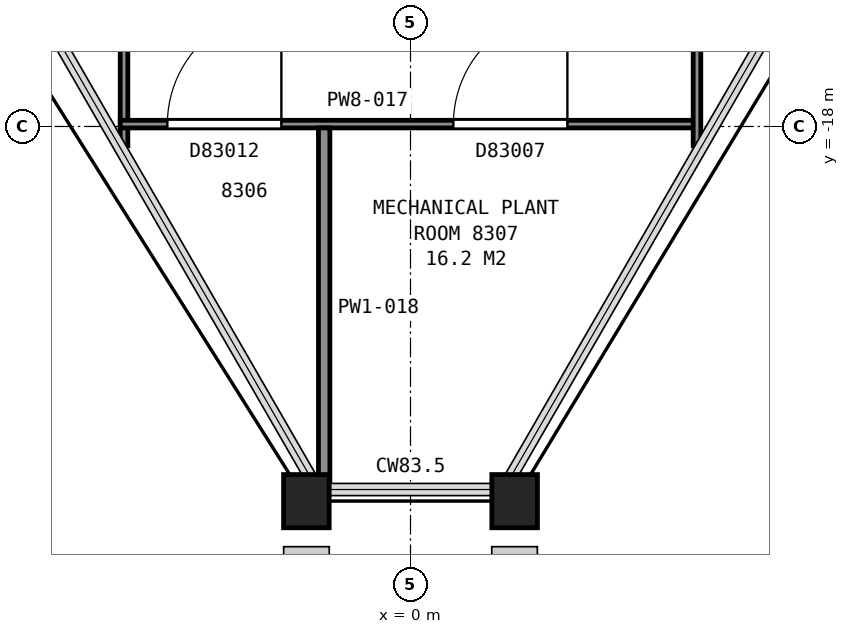
"""IFC4 building model, lengths in metres.
Left out: names, types, materials, properties, quantities, classifications, styles, units other than length and angle.
Written with IfcOpenShell. Run it as: python <this file> out.ifc"""

import sys

from ifc_helpers import new_model, si_unit, direction, frame, frame_2d, origin, origin_2d, place, context, subcontext, project, spatial, rectangle, hollow_rectangle, extrude, element, fill, save


model = new_model("IFC4")
c1 = context("Model", 3, precision=1e-05, world=origin(), true_north=direction((0.0, 1.0)))
c2 = subcontext(c1, "Body", "Model", "MODEL_VIEW")
j1 = project(units=[si_unit("LENGTHUNIT", "METRE"), si_unit("PLANEANGLEUNIT", "RADIAN")], contexts=[c1])
p1 = place(None, origin())
s1 = spatial("IfcSite", under=j1, at=p1, CompositionType="ELEMENT")
p2 = place(p1, origin())
s2 = spatial("IfcBuilding", under=s1, at=p2, CompositionType="ELEMENT")
p3 = place(p2, frame((0.0, 0.0, 329.4)))
s3 = spatial("IfcBuildingStorey", under=s2, at=p3, CompositionType="ELEMENT", Elevation=329.4)
for number, where, z_axis, x_axis in (
    (1, (-1.37, -22.93, 0.0), (0.0, 0.0, 1.0), (-1.0, 0.0, 0.0)),
    (2, (1.37, -22.93, 0.0), (0.0, 0.0, 1.0), (-1.0, 0.0, 0.0)),
):
    element("IfcColumn", number, at=place(p3, frame(where, z_axis=z_axis, x_axis=x_axis)), inside=s3, PredefinedType="COLUMN", context=c2, shape_type="SweptSolid", body=[
        extrude(hollow_rectangle(XDim=0.6, YDim=0.7, WallThickness=0.04, at=origin_2d()), origin(), (0.0, 0.0, 1.0), 3.9),
    ])
p4 = place(p3, frame((-3.769, -18.253, 0.0), z_axis=(0.0, 0.0, 1.0), x_axis=(0.0, 1.0, 0.0)))
e3 = element("IfcWall", 3, at=p4, inside=s3, PredefinedType="PARTITIONING", context=c2, shape_type="SweptSolid", body=[
    extrude(rectangle(XDim=7.512, YDim=0.1, at=frame_2d((3.756, 0.0))), origin(), (0.0, 0.0, 1.0), 3.297),
])
p5 = place(p4, frame((3.184, 0.0, 0.0)))
e4 = element("IfcOpeningElement", 4, at=p5, cuts=e3, PredefinedType="OPENING", context=c2, shape_type="SweptSolid", body=[
    extrude(rectangle(XDim=1.5, YDim=2.1, at=frame_2d((0.75, 1.05))), frame((0.0, 0.06, 0.0), z_axis=(0.0, -1.0, 0.0), x_axis=(1.0, 0.0, 0.0)), (0.0, 0.0, 1.0), 0.12),
])
p6 = place(p3, frame((3.769, -17.969, 0.0), z_axis=(0.0, 0.0, 1.0), x_axis=(-1.0, 0.0, 0.0)))
e5 = element("IfcWall", 5, at=p6, inside=s3, PredefinedType="PARTITIONING", context=c2, shape_type="SweptSolid", body=[
    extrude(rectangle(XDim=7.588, YDim=0.1, at=frame_2d((3.794, 0.0))), origin(), (0.0, 0.0, 1.0), 3.297),
])
p7 = place(p6, frame((1.705, 0.0, 0.0)))
e6 = element("IfcOpeningElement", 6, at=p7, cuts=e5, PredefinedType="OPENING", context=c2, shape_type="SweptSolid", body=[
    extrude(rectangle(XDim=1.5, YDim=2.1, at=frame_2d((0.75, 1.05))), frame((0.0, 0.06, 0.0), z_axis=(0.0, -1.0, 0.0), x_axis=(1.0, 0.0, 0.0)), (0.0, 0.0, 1.0), 0.12),
])
p8 = place(p6, frame((5.468, 0.0, 0.0)))
e7 = element("IfcOpeningElement", 7, at=p8, cuts=e5, PredefinedType="OPENING", context=c2, shape_type="SweptSolid", body=[
    extrude(rectangle(XDim=1.5, YDim=2.1, at=frame_2d((0.75, 1.05))), frame((0.0, 0.06, 0.0), z_axis=(0.0, -1.0, 0.0), x_axis=(1.0, 0.0, 0.0)), (0.0, 0.0, 1.0), 0.12),
])
p9 = place(p3, frame((-1.136, -22.764, 0.0), z_axis=(0.0, 0.0, 1.0), x_axis=(0.0, 1.0, 0.0)))
e8 = element("IfcWall", 8, at=p9, inside=s3, PredefinedType="PARTITIONING", context=c2, shape_type="SweptSolid", body=[
    extrude(rectangle(XDim=4.745, YDim=0.15, at=frame_2d((2.373, 0.0))), origin(), (0.0, 0.0, 1.0), 3.297),
])
p10 = place(p3, frame((3.769, -10.741, 0.0), z_axis=(0.0, 0.0, 1.0), x_axis=(0.0, -1.0, 0.0)))
e9 = element("IfcWall", 9, at=p10, inside=s3, PredefinedType="PARTITIONING", context=c2, shape_type="SweptSolid", body=[
    extrude(rectangle(XDim=7.512, YDim=0.1, at=frame_2d((3.756, 0.0))), origin(), (0.0, 0.0, 1.0), 3.297),
])
p11 = place(p10, frame((3.108, 0.0, 0.0)))
e10 = element("IfcOpeningElement", 10, at=p11, cuts=e9, PredefinedType="OPENING", context=c2, shape_type="SweptSolid", body=[
    extrude(rectangle(XDim=1.5, YDim=2.1, at=frame_2d((0.75, 1.05))), frame((0.0, 0.06, 0.0), z_axis=(0.0, -1.0, 0.0), x_axis=(1.0, 0.0, 0.0)), (0.0, 0.0, 1.0), 0.12),
])
p12 = place(p7, origin())
e11 = element("IfcDoor", 11, at=p12, inside=s3, OperationType="DOUBLE_DOOR_SINGLE_SWING", PredefinedType="DOOR", context=c2, shape_type="SweptSolid", body=[
    extrude(rectangle(XDim=1.5, YDim=2.1, at=frame_2d((0.75, 1.05))), frame((0.0, 0.025, 0.0), z_axis=(0.0, -1.0, 0.0), x_axis=(1.0, 0.0, 0.0)), (0.0, 0.0, 1.0), 0.05),
])
fill(e6, e11)
p13 = place(p8, origin())
e12 = element("IfcDoor", 12, at=p13, inside=s3, OperationType="DOUBLE_DOOR_SINGLE_SWING", PredefinedType="DOOR", context=c2, shape_type="SweptSolid", body=[
    extrude(rectangle(XDim=1.5, YDim=2.1, at=frame_2d((0.75, 1.05))), frame((0.0, 0.025, 0.0), z_axis=(0.0, -1.0, 0.0), x_axis=(1.0, 0.0, 0.0)), (0.0, 0.0, 1.0), 0.05),
])
fill(e7, e12)
save(model, sys.argv[1])
